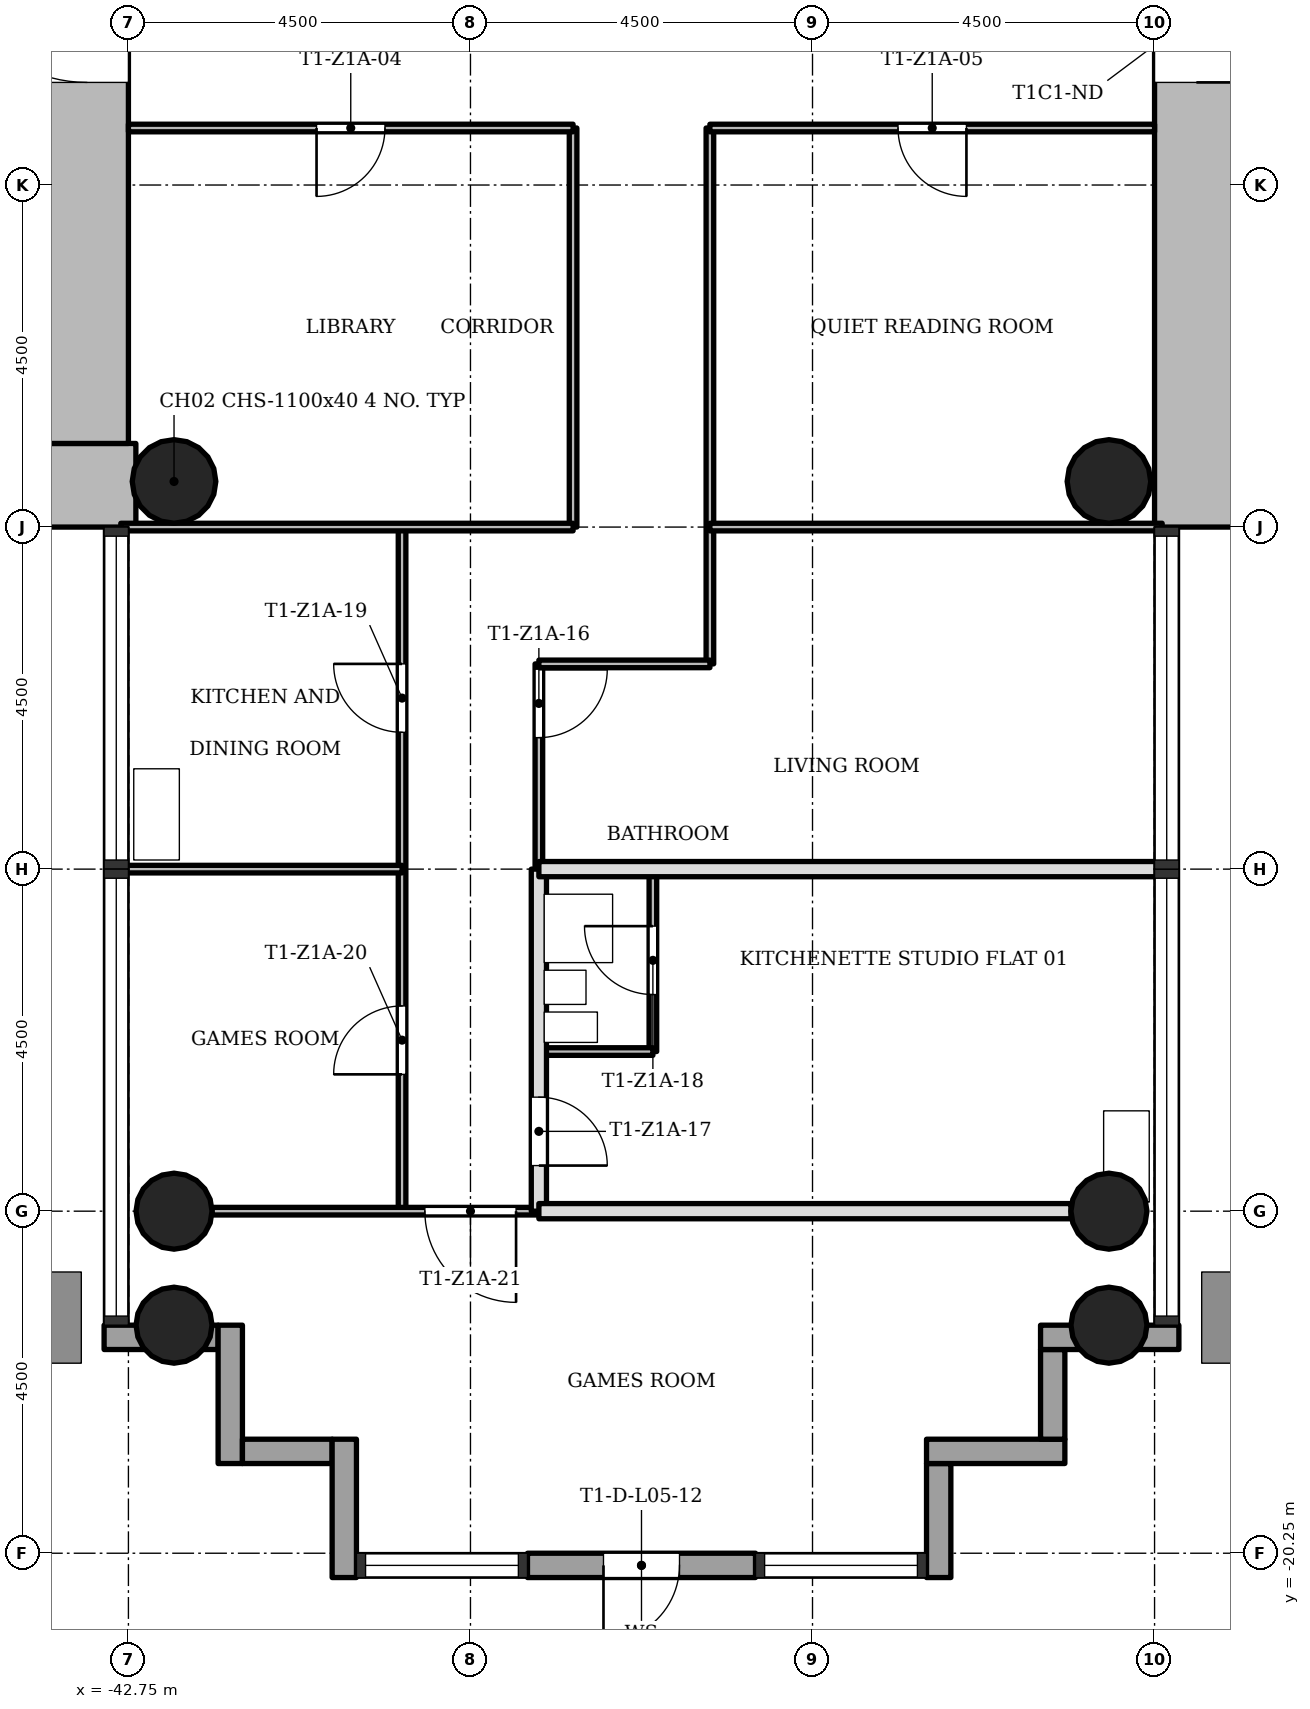
"""IFC4 building model, lengths in metres.
Left out: names, types, materials, properties, quantities, classifications, styles, units other than length and angle.
Written with IfcOpenShell. Run it as: python <this file> out.ifc"""

import sys

from ifc_helpers import new_model, si_unit, direction, frame, frame_2d, origin, origin_2d, place, context, subcontext, project, spatial, rectangle, hollow_circle, extrude, element, fill, save


model = new_model("IFC4")
c1 = context("Model", 3, precision=1e-05, world=origin(), true_north=direction((0.0, 1.0)))
c2 = subcontext(c1, "Body", "Model", "MODEL_VIEW")
j1 = project(units=[si_unit("LENGTHUNIT", "METRE"), si_unit("PLANEANGLEUNIT", "RADIAN")], contexts=[c1])
p1 = place(None, origin())
s1 = spatial("IfcSite", under=j1, at=p1, CompositionType="ELEMENT")
p2 = place(p1, origin())
s2 = spatial("IfcBuilding", under=s1, at=p2, CompositionType="ELEMENT")
p3 = place(p2, frame((0.0, 0.0, 24.5)))
s3 = spatial("IfcBuildingStorey", under=s2, at=p3, CompositionType="ELEMENT", Elevation=24.5)
p4 = place(p3, frame((-28.7, 5.65, 0.0), z_axis=(0.0, 0.0, 1.0), x_axis=(0.0, -1.0, 0.0)))
e1 = element("IfcWall", 1, at=p4, inside=s3, PredefinedType="SHEAR", context=c2, shape_type="SweptSolid", body=[
    extrude(rectangle(XDim=12.4, YDim=1.1, at=frame_2d((6.2, 0.0))), origin(), (0.0, 0.0, 1.0), 3.4),
])
p5 = place(p4, frame((4.75, 0.0, 0.0)))
e2 = element("IfcOpeningElement", 2, at=p5, cuts=e1, PredefinedType="OPENING", context=c2, shape_type="SweptSolid", body=[
    extrude(rectangle(XDim=1.8, YDim=2.1, at=frame_2d((0.9, 1.05))), frame((0.0, 0.56, 0.0), z_axis=(0.0, -1.0, 0.0), x_axis=(1.0, 0.0, 0.0)), (0.0, 0.0, 1.0), 1.12),
])
p6 = place(p3, frame((-50.65, -6.2, 0.0), z_axis=(0.0, 0.0, 1.0), x_axis=(1.0, 0.0, 0.0)))
e3 = element("IfcWall", 3, at=p6, inside=s3, PredefinedType="SHEAR", context=c2, shape_type="SweptSolid", body=[
    extrude(rectangle(XDim=7.998, YDim=1.1, at=frame_2d((3.999, 0.0))), origin(), (0.0, 0.0, 1.0), 3.4),
])
p7 = place(p3, frame((-43.3, -5.65, 0.0), z_axis=(0.0, 0.0, 1.0), x_axis=(0.0, 1.0, 0.0)))
e4 = element("IfcWall", 4, at=p7, inside=s3, PredefinedType="SHEAR", context=c2, shape_type="SweptSolid", body=[
    extrude(rectangle(XDim=12.4, YDim=1.1, at=frame_2d((6.2, 0.0))), origin(), (0.0, 0.0, 1.0), 3.4),
])
p8 = place(p7, frame((4.75, 0.0, 0.0)))
e5 = element("IfcOpeningElement", 5, at=p8, cuts=e4, PredefinedType="OPENING", context=c2, shape_type="SweptSolid", body=[
    extrude(rectangle(XDim=1.8, YDim=2.1, at=frame_2d((0.9, 1.05))), frame((0.0, 0.56, 0.0), z_axis=(0.0, -1.0, 0.0), x_axis=(1.0, 0.0, 0.0)), (0.0, 0.0, 1.0), 1.12),
])
for number, where, z_axis, x_axis in (
    (6, (-42.15, -15.75, 0.0), (0.0, 0.0, 1.0), (1.0, 0.0, 0.0)),
    (7, (-29.85, -15.75, 0.0), (0.0, 0.0, 1.0), (1.0, 0.0, 0.0)),
    (8, (-42.15, -17.25, 0.0), (0.0, 0.0, 1.0), (1.0, 0.0, 0.0)),
    (9, (-29.85, -17.25, 0.0), (0.0, 0.0, 1.0), (1.0, 0.0, 0.0)),
):
    element("IfcColumn", number, at=place(p3, frame(where, z_axis=z_axis, x_axis=x_axis)), inside=s3, PredefinedType="COLUMN", context=c2, shape_type="SweptSolid", body=[
        extrude(hollow_circle(Radius=0.5, WallThickness=0.036, at=origin_2d()), origin(), (0.0, 0.0, 1.0), 3.4),
    ])
for number, where, z_axis, x_axis in (
    (10, (-42.15, -6.15, 0.0), (0.0, 0.0, 1.0), (1.0, 0.0, 0.0)),
    (11, (-29.85, -6.15, 0.0), (0.0, 0.0, 1.0), (1.0, 0.0, 0.0)),
):
    element("IfcColumn", number, at=place(p3, frame(where, z_axis=z_axis, x_axis=x_axis)), inside=s3, PredefinedType="COLUMN", context=c2, shape_type="SweptSolid", body=[
        extrude(hollow_circle(Radius=0.55, WallThickness=0.04, at=origin_2d()), origin(), (0.0, 0.0, 1.0), 3.4),
    ])
p9 = place(p3, frame((-43.07, -17.41, 0.0), z_axis=(0.0, 0.0, 1.0), x_axis=(1.0, 0.0, 0.0)))
e12 = element("IfcWall", 12, at=p9, inside=s3, PredefinedType="STANDARD", context=c2, shape_type="SweptSolid", body=[
    extrude(rectangle(XDim=1.5, YDim=0.32, at=frame_2d((0.75, 0.0))), origin(), (0.0, 0.0, 1.0), 3.1),
])
p10 = place(p3, frame((-41.41, -17.25, 0.0), z_axis=(0.0, 0.0, 1.0), x_axis=(0.0, -1.0, 0.0)))
e13 = element("IfcWall", 13, at=p10, inside=s3, PredefinedType="STANDARD", context=c2, shape_type="SweptSolid", body=[
    extrude(rectangle(XDim=1.82, YDim=0.32, at=frame_2d((0.91, 0.0))), origin(), (0.0, 0.0, 1.0), 3.1),
])
p11 = place(p3, frame((-41.25, -18.91, 0.0), z_axis=(0.0, 0.0, 1.0), x_axis=(1.0, 0.0, 0.0)))
e14 = element("IfcWall", 14, at=p11, inside=s3, PredefinedType="STANDARD", context=c2, shape_type="SweptSolid", body=[
    extrude(rectangle(XDim=1.18, YDim=0.32, at=frame_2d((0.59, 0.0))), origin(), (0.0, 0.0, 1.0), 3.1),
])
p12 = place(p3, frame((-39.91, -18.75, 0.0), z_axis=(0.0, 0.0, 1.0), x_axis=(0.0, -1.0, 0.0)))
e15 = element("IfcWall", 15, at=p12, inside=s3, PredefinedType="STANDARD", context=c2, shape_type="SweptSolid", body=[
    extrude(rectangle(XDim=1.82, YDim=0.32, at=frame_2d((0.91, 0.0))), origin(), (0.0, 0.0, 1.0), 3.1),
])
p13 = place(p3, frame((-37.5, -20.41, 0.0), z_axis=(0.0, 0.0, 1.0), x_axis=(1.0, 0.0, 0.0)))
e16 = element("IfcWall", 16, at=p13, inside=s3, PredefinedType="STANDARD", context=c2, shape_type="SweptSolid", body=[
    extrude(rectangle(XDim=3.0, YDim=0.32, at=frame_2d((1.5, 0.0))), origin(), (0.0, 0.0, 1.0), 3.1),
])
p14 = place(p13, frame((1.0, 0.0, 0.0)))
e17 = element("IfcOpeningElement", 17, at=p14, cuts=e16, PredefinedType="OPENING", context=c2, shape_type="SweptSolid", body=[
    extrude(rectangle(XDim=1.0, YDim=2.1, at=frame_2d((0.5, 1.05))), frame((0.0, 0.17, 0.0), z_axis=(0.0, -1.0, 0.0), x_axis=(1.0, 0.0, 0.0)), (0.0, 0.0, 1.0), 0.34),
])
p15 = place(p3, frame((-32.09, -20.57, 0.0), z_axis=(0.0, 0.0, 1.0), x_axis=(0.0, 1.0, 0.0)))
e18 = element("IfcWall", 18, at=p15, inside=s3, PredefinedType="STANDARD", context=c2, shape_type="SweptSolid", body=[
    extrude(rectangle(XDim=1.5, YDim=0.32, at=frame_2d((0.75, 0.0))), origin(), (0.0, 0.0, 1.0), 3.1),
])
p16 = place(p3, frame((-32.25, -18.91, 0.0), z_axis=(0.0, 0.0, 1.0), x_axis=(1.0, 0.0, 0.0)))
e19 = element("IfcWall", 19, at=p16, inside=s3, PredefinedType="STANDARD", context=c2, shape_type="SweptSolid", body=[
    extrude(rectangle(XDim=1.82, YDim=0.32, at=frame_2d((0.91, 0.0))), origin(), (0.0, 0.0, 1.0), 3.1),
])
p17 = place(p3, frame((-30.59, -18.75, 0.0), z_axis=(0.0, 0.0, 1.0), x_axis=(0.0, 1.0, 0.0)))
e20 = element("IfcWall", 20, at=p17, inside=s3, PredefinedType="STANDARD", context=c2, shape_type="SweptSolid", body=[
    extrude(rectangle(XDim=1.18, YDim=0.32, at=frame_2d((0.59, 0.0))), origin(), (0.0, 0.0, 1.0), 3.1),
])
p18 = place(p3, frame((-30.75, -17.41, 0.0), z_axis=(0.0, 0.0, 1.0), x_axis=(1.0, 0.0, 0.0)))
e21 = element("IfcWall", 21, at=p18, inside=s3, PredefinedType="STANDARD", context=c2, shape_type="SweptSolid", body=[
    extrude(rectangle(XDim=1.82, YDim=0.32, at=frame_2d((0.91, 0.0))), origin(), (0.0, 0.0, 1.0), 3.1),
])
p19 = place(p3, frame((-39.15, -15.75, 0.0), z_axis=(0.0, 0.0, 1.0), x_axis=(0.0, 1.0, 0.0)))
e22 = element("IfcWall", 22, at=p19, inside=s3, PredefinedType="PARTITIONING", context=c2, shape_type="SweptSolid", body=[
    extrude(rectangle(XDim=9.0, YDim=0.1, at=frame_2d((4.5, 0.0))), origin(), (0.0, 0.0, 1.0), 3.0),
])
p20 = place(p19, frame((6.3, 0.0, 0.0)))
e23 = element("IfcOpeningElement", 23, at=p20, cuts=e22, PredefinedType="OPENING", context=c2, shape_type="SweptSolid", body=[
    extrude(rectangle(XDim=0.9, YDim=2.1, at=frame_2d((0.45, 1.05))), frame((0.0, 0.06, 0.0), z_axis=(0.0, -1.0, 0.0), x_axis=(1.0, 0.0, 0.0)), (0.0, 0.0, 1.0), 0.12),
])
p21 = place(p19, frame((1.8, 0.0, 0.0)))
e24 = element("IfcOpeningElement", 24, at=p21, cuts=e22, PredefinedType="OPENING", context=c2, shape_type="SweptSolid", body=[
    extrude(rectangle(XDim=0.9, YDim=2.1, at=frame_2d((0.45, 1.05))), frame((0.0, 0.06, 0.0), z_axis=(0.0, -1.0, 0.0), x_axis=(1.0, 0.0, 0.0)), (0.0, 0.0, 1.0), 0.12),
])
p22 = place(p3, frame((-37.35, -11.25, 0.0), z_axis=(0.0, 0.0, 1.0), x_axis=(0.0, 1.0, 0.0)))
e25 = element("IfcWall", 25, at=p22, inside=s3, PredefinedType="PARTITIONING", context=c2, shape_type="SweptSolid", body=[
    extrude(rectangle(XDim=2.7, YDim=0.1, at=frame_2d((1.35, 0.0))), origin(), (0.0, 0.0, 1.0), 3.0),
])
p23 = place(p22, frame((1.73, 0.0, 0.0)))
e26 = element("IfcOpeningElement", 26, at=p23, cuts=e25, PredefinedType="OPENING", context=c2, shape_type="SweptSolid", body=[
    extrude(rectangle(XDim=0.9, YDim=2.1, at=frame_2d((0.45, 1.05))), frame((0.0, 0.06, 0.0), z_axis=(0.0, -1.0, 0.0), x_axis=(1.0, 0.0, 0.0)), (0.0, 0.0, 1.0), 0.12),
])
p24 = place(p3, frame((-37.35, -15.75, 0.0), z_axis=(0.0, 0.0, 1.0), x_axis=(0.0, 1.0, 0.0)))
e27 = element("IfcWall", 27, at=p24, inside=s3, PredefinedType="SOLIDWALL", context=c2, shape_type="SweptSolid", body=[
    extrude(rectangle(XDim=4.5, YDim=0.2, at=frame_2d((2.25, 0.0))), origin(), (0.0, 0.0, 1.0), 3.0),
])
p25 = place(p24, frame((0.6, 0.0, 0.0)))
e28 = element("IfcOpeningElement", 28, at=p25, cuts=e27, PredefinedType="OPENING", context=c2, shape_type="SweptSolid", body=[
    extrude(rectangle(XDim=0.9, YDim=2.1, at=frame_2d((0.45, 1.05))), frame((0.0, 0.11, 0.0), z_axis=(0.0, -1.0, 0.0), x_axis=(1.0, 0.0, 0.0)), (0.0, 0.0, 1.0), 0.22),
])
p26 = place(p3, frame((-36.9, -6.75, 0.0), z_axis=(0.0, 0.0, 1.0), x_axis=(0.0, 1.0, 0.0)))
e29 = element("IfcWall", 29, at=p26, inside=s3, PredefinedType="PARTITIONING", context=c2, shape_type="SweptSolid", body=[
    extrude(rectangle(XDim=5.25, YDim=0.1, at=frame_2d((2.625, 0.0))), origin(), (0.0, 0.0, 1.0), 3.0),
])
p27 = place(p3, frame((-35.85, -13.65, 0.0), z_axis=(0.0, 0.0, 1.0), x_axis=(0.0, 1.0, 0.0)))
e30 = element("IfcWall", 30, at=p27, inside=s3, PredefinedType="PARTITIONING", context=c2, shape_type="SweptSolid", body=[
    extrude(rectangle(XDim=2.4, YDim=0.1, at=frame_2d((1.2, 0.0))), origin(), (0.0, 0.0, 1.0), 3.0),
])
p28 = place(p27, frame((0.75, 0.0, 0.0)))
e31 = element("IfcOpeningElement", 31, at=p28, cuts=e30, PredefinedType="OPENING", context=c2, shape_type="SweptSolid", body=[
    extrude(rectangle(XDim=0.9, YDim=2.1, at=frame_2d((0.45, 1.05))), frame((0.0, 0.06, 0.0), z_axis=(0.0, -1.0, 0.0), x_axis=(1.0, 0.0, 0.0)), (0.0, 0.0, 1.0), 0.12),
])
p29 = place(p3, frame((-35.1, -8.55, 0.0), z_axis=(0.0, 0.0, 1.0), x_axis=(0.0, 1.0, 0.0)))
e32 = element("IfcWall", 32, at=p29, inside=s3, PredefinedType="PARTITIONING", context=c2, shape_type="SweptSolid", body=[
    extrude(rectangle(XDim=7.05, YDim=0.1, at=frame_2d((3.525, 0.0))), origin(), (0.0, 0.0, 1.0), 3.0),
])
p30 = place(p3, frame((-41.65, -15.75, 0.0), z_axis=(0.0, 0.0, 1.0), x_axis=(1.0, 0.0, 0.0)))
e33 = element("IfcWall", 33, at=p30, inside=s3, PredefinedType="PARTITIONING", context=c2, shape_type="SweptSolid", body=[
    extrude(rectangle(XDim=4.3, YDim=0.1, at=frame_2d((2.15, 0.0))), origin(), (0.0, 0.0, 1.0), 3.0),
])
p31 = place(p30, frame((2.8, 0.0, 0.0)))
e34 = element("IfcOpeningElement", 34, at=p31, cuts=e33, PredefinedType="OPENING", context=c2, shape_type="SweptSolid", body=[
    extrude(rectangle(XDim=1.2, YDim=2.1, at=frame_2d((0.6, 1.05))), frame((0.0, 0.06, 0.0), z_axis=(0.0, -1.0, 0.0), x_axis=(1.0, 0.0, 0.0)), (0.0, 0.0, 1.0), 0.12),
])
p32 = place(p3, frame((-37.35, -15.75, 0.0), z_axis=(0.0, 0.0, 1.0), x_axis=(1.0, 0.0, 0.0)))
e35 = element("IfcWall", 35, at=p32, inside=s3, PredefinedType="SOLIDWALL", context=c2, shape_type="SweptSolid", body=[
    extrude(rectangle(XDim=7.0, YDim=0.2, at=frame_2d((3.5, 0.0))), origin(), (0.0, 0.0, 1.0), 3.0),
])
p33 = place(p3, frame((-37.35, -13.65, 0.0), z_axis=(0.0, 0.0, 1.0), x_axis=(1.0, 0.0, 0.0)))
e36 = element("IfcWall", 36, at=p33, inside=s3, PredefinedType="PARTITIONING", context=c2, shape_type="SweptSolid", body=[
    extrude(rectangle(XDim=1.5, YDim=0.1, at=frame_2d((0.75, 0.0))), origin(), (0.0, 0.0, 1.0), 3.0),
])
p34 = place(p3, frame((-42.85, -11.25, 0.0), z_axis=(0.0, 0.0, 1.0), x_axis=(1.0, 0.0, 0.0)))
e37 = element("IfcWall", 37, at=p34, inside=s3, PredefinedType="PARTITIONING", context=c2, shape_type="SweptSolid", body=[
    extrude(rectangle(XDim=3.7, YDim=0.1, at=frame_2d((1.85, 0.0))), origin(), (0.0, 0.0, 1.0), 3.0),
])
p35 = place(p3, frame((-37.35, -11.25, 0.0), z_axis=(0.0, 0.0, 1.0), x_axis=(1.0, 0.0, 0.0)))
e38 = element("IfcWall", 38, at=p35, inside=s3, PredefinedType="SOLIDWALL", context=c2, shape_type="SweptSolid", body=[
    extrude(rectangle(XDim=8.2, YDim=0.2, at=frame_2d((4.1, 0.0))), origin(), (0.0, 0.0, 1.0), 3.0),
])
p36 = place(p3, frame((-37.35, -8.55, 0.0), z_axis=(0.0, 0.0, 1.0), x_axis=(1.0, 0.0, 0.0)))
e39 = element("IfcWall", 39, at=p36, inside=s3, PredefinedType="PARTITIONING", context=c2, shape_type="SweptSolid", body=[
    extrude(rectangle(XDim=2.25, YDim=0.1, at=frame_2d((1.125, 0.0))), origin(), (0.0, 0.0, 1.0), 3.0),
])
for number, where, z_axis, x_axis in (
    (40, (-42.85, -6.75, 0.0), (0.0, 0.0, 1.0), (1.0, 0.0, 0.0)),
    (41, (-35.1, -6.75, 0.0), (0.0, 0.0, 1.0), (1.0, 0.0, 0.0)),
):
    element("IfcWall", number, at=place(p3, frame(where, z_axis=z_axis, x_axis=x_axis)), inside=s3, PredefinedType="PARTITIONING", context=c2, shape_type="SweptSolid", body=[
        extrude(rectangle(XDim=5.95, YDim=0.1, at=frame_2d((2.975, 0.0))), origin(), (0.0, 0.0, 1.0), 3.0),
    ])
p37 = place(p3, frame((-42.75, -1.5, 0.0), z_axis=(0.0, 0.0, 1.0), x_axis=(1.0, 0.0, 0.0)))
e42 = element("IfcWall", 42, at=p37, inside=s3, PredefinedType="PARTITIONING", context=c2, shape_type="SweptSolid", body=[
    extrude(rectangle(XDim=5.85, YDim=0.1, at=frame_2d((2.925, 0.0))), origin(), (0.0, 0.0, 1.0), 3.0),
])
p38 = place(p37, frame((2.475, 0.0, 0.0)))
e43 = element("IfcOpeningElement", 43, at=p38, cuts=e42, PredefinedType="OPENING", context=c2, shape_type="SweptSolid", body=[
    extrude(rectangle(XDim=0.9, YDim=2.1, at=frame_2d((0.45, 1.05))), frame((0.0, 0.06, 0.0), z_axis=(0.0, -1.0, 0.0), x_axis=(1.0, 0.0, 0.0)), (0.0, 0.0, 1.0), 0.12),
])
p39 = place(p3, frame((-35.1, -1.5, 0.0), z_axis=(0.0, 0.0, 1.0), x_axis=(1.0, 0.0, 0.0)))
e44 = element("IfcWall", 44, at=p39, inside=s3, PredefinedType="PARTITIONING", context=c2, shape_type="SweptSolid", body=[
    extrude(rectangle(XDim=5.85, YDim=0.1, at=frame_2d((2.925, 0.0))), origin(), (0.0, 0.0, 1.0), 3.0),
])
p40 = place(p39, frame((2.475, 0.0, 0.0)))
e45 = element("IfcOpeningElement", 45, at=p40, cuts=e44, PredefinedType="OPENING", context=c2, shape_type="SweptSolid", body=[
    extrude(rectangle(XDim=0.9, YDim=2.1, at=frame_2d((0.45, 1.05))), frame((0.0, 0.06, 0.0), z_axis=(0.0, -1.0, 0.0), x_axis=(1.0, 0.0, 0.0)), (0.0, 0.0, 1.0), 0.12),
])
p41 = place(p14, origin())
e46 = element("IfcDoor", 46, at=p41, inside=s3, OperationType="SINGLE_SWING_LEFT", PredefinedType="DOOR", context=c2, shape_type="SweptSolid", body=[
    extrude(rectangle(XDim=1.0, YDim=2.1, at=frame_2d((0.5, 1.05))), frame((0.0, 0.025, 0.0), z_axis=(0.0, -1.0, 0.0), x_axis=(1.0, 0.0, 0.0)), (0.0, 0.0, 1.0), 0.05),
])
fill(e17, e46)
p42 = place(p38, origin())
e47 = element("IfcDoor", 47, at=p42, inside=s3, OperationType="SINGLE_SWING_LEFT", PredefinedType="DOOR", context=c2, shape_type="SweptSolid", body=[
    extrude(rectangle(XDim=0.9, YDim=2.1, at=frame_2d((0.45, 1.05))), frame((0.0, 0.025, 0.0), z_axis=(0.0, -1.0, 0.0), x_axis=(1.0, 0.0, 0.0)), (0.0, 0.0, 1.0), 0.05),
])
fill(e43, e47)
p43 = place(p40, origin())
e48 = element("IfcDoor", 48, at=p43, inside=s3, OperationType="SINGLE_SWING_RIGHT", PredefinedType="DOOR", context=c2, shape_type="SweptSolid", body=[
    extrude(rectangle(XDim=0.9, YDim=2.1, at=frame_2d((0.45, 1.05))), frame((0.0, 0.025, 0.0), z_axis=(0.0, -1.0, 0.0), x_axis=(1.0, 0.0, 0.0)), (0.0, 0.0, 1.0), 0.05),
])
fill(e45, e48)
p44 = place(p23, origin())
e49 = element("IfcDoor", 49, at=p44, inside=s3, OperationType="SINGLE_SWING_RIGHT", PredefinedType="DOOR", context=c2, shape_type="SweptSolid", body=[
    extrude(rectangle(XDim=0.9, YDim=2.1, at=frame_2d((0.45, 1.05))), frame((0.0, 0.025, 0.0), z_axis=(0.0, -1.0, 0.0), x_axis=(1.0, 0.0, 0.0)), (0.0, 0.0, 1.0), 0.05),
])
fill(e26, e49)
p45 = place(p25, origin())
e50 = element("IfcDoor", 50, at=p45, inside=s3, OperationType="SINGLE_SWING_LEFT", PredefinedType="DOOR", context=c2, shape_type="SweptSolid", body=[
    extrude(rectangle(XDim=0.9, YDim=2.1, at=frame_2d((0.45, 1.05))), frame((0.0, 0.025, 0.0), z_axis=(0.0, -1.0, 0.0), x_axis=(1.0, 0.0, 0.0)), (0.0, 0.0, 1.0), 0.05),
])
fill(e28, e50)
p46 = place(p28, origin())
e51 = element("IfcDoor", 51, at=p46, inside=s3, OperationType="SINGLE_SWING_LEFT", PredefinedType="DOOR", context=c2, shape_type="SweptSolid", body=[
    extrude(rectangle(XDim=0.9, YDim=2.1, at=frame_2d((0.45, 1.05))), frame((0.0, 0.025, 0.0), z_axis=(0.0, -1.0, 0.0), x_axis=(1.0, 0.0, 0.0)), (0.0, 0.0, 1.0), 0.05),
])
fill(e31, e51)
p47 = place(p20, origin())
e52 = element("IfcDoor", 52, at=p47, inside=s3, OperationType="SINGLE_SWING_LEFT", PredefinedType="DOOR", context=c2, shape_type="SweptSolid", body=[
    extrude(rectangle(XDim=0.9, YDim=2.1, at=frame_2d((0.45, 1.05))), frame((0.0, 0.025, 0.0), z_axis=(0.0, -1.0, 0.0), x_axis=(1.0, 0.0, 0.0)), (0.0, 0.0, 1.0), 0.05),
])
fill(e23, e52)
p48 = place(p21, origin())
e53 = element("IfcDoor", 53, at=p48, inside=s3, OperationType="SINGLE_SWING_RIGHT", PredefinedType="DOOR", context=c2, shape_type="SweptSolid", body=[
    extrude(rectangle(XDim=0.9, YDim=2.1, at=frame_2d((0.45, 1.05))), frame((0.0, 0.025, 0.0), z_axis=(0.0, -1.0, 0.0), x_axis=(1.0, 0.0, 0.0)), (0.0, 0.0, 1.0), 0.05),
])
fill(e24, e53)
p49 = place(p31, origin())
e54 = element("IfcDoor", 54, at=p49, inside=s3, OperationType="SINGLE_SWING_RIGHT", PredefinedType="DOOR", context=c2, shape_type="SweptSolid", body=[
    extrude(rectangle(XDim=1.2, YDim=2.1, at=frame_2d((0.6, 1.05))), frame((0.0, 0.025, 0.0), z_axis=(0.0, -1.0, 0.0), x_axis=(1.0, 0.0, 0.0)), (0.0, 0.0, 1.0), 0.05),
])
fill(e34, e54)
p50 = place(p5, origin())
e55 = element("IfcDoor", 55, at=p50, inside=s3, OperationType="SINGLE_SWING_LEFT", PredefinedType="DOOR", context=c2, shape_type="SweptSolid", body=[
    extrude(rectangle(XDim=1.8, YDim=2.1, at=frame_2d((0.9, 1.05))), frame((0.0, 0.025, 0.0), z_axis=(0.0, -1.0, 0.0), x_axis=(1.0, 0.0, 0.0)), (0.0, 0.0, 1.0), 0.05),
])
fill(e2, e55)
p51 = place(p8, origin())
e56 = element("IfcDoor", 56, at=p51, inside=s3, OperationType="SINGLE_SWING_LEFT", PredefinedType="DOOR", context=c2, shape_type="SweptSolid", body=[
    extrude(rectangle(XDim=1.8, YDim=2.1, at=frame_2d((0.9, 1.05))), frame((0.0, 0.025, 0.0), z_axis=(0.0, -1.0, 0.0), x_axis=(1.0, 0.0, 0.0)), (0.0, 0.0, 1.0), 0.05),
])
fill(e5, e56)
save(model, sys.argv[1])
